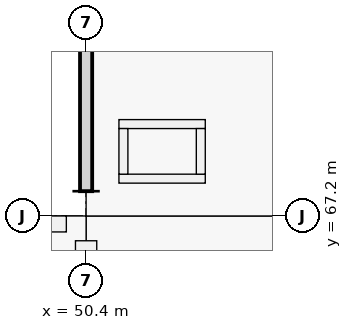
"""IFC4 building model, lengths in metres.
Left out: names, types, materials, properties, quantities, classifications, styles, units other than length and angle.
Written with IfcOpenShell. Run it as: python <this file> out.ifc"""

import sys

from ifc_helpers import new_model, si_unit, direction, frame, frame_2d, origin, origin_2d, place, context, subcontext, project, spatial, rectangle, extrude, element, save


model = new_model("IFC4")
c1 = context("Model", 3, precision=1e-05, world=origin(), true_north=direction((0.0, 1.0)))
c2 = subcontext(c1, "Body", "Model", "MODEL_VIEW")
j1 = project(units=[si_unit("LENGTHUNIT", "METRE"), si_unit("PLANEANGLEUNIT", "RADIAN")], contexts=[c1])
p1 = place(None, origin())
s1 = spatial("IfcSite", under=j1, at=p1, CompositionType="ELEMENT")
p2 = place(p1, origin())
s2 = spatial("IfcBuilding", under=s1, at=p2, CompositionType="ELEMENT")
p3 = place(p2, frame((0.0, 0.0, 14.76)))
s3 = spatial("IfcBuildingStorey", under=s2, at=p3, CompositionType="ELEMENT", Elevation=14.76)
p4 = place(p3, frame((50.4, 67.2, 0.0), z_axis=(0.0, 0.0, 1.0), x_axis=(1.0, 0.0, 0.0)))
e1 = element("IfcColumn", 1, at=p4, inside=s3, PredefinedType="COLUMN", context=c2, shape_type="SweptSolid", body=[
    extrude(rectangle(XDim=0.65, YDim=0.65, at=origin_2d()), origin(), (0.0, 0.0, 1.0), 4.32),
])
p5 = place(p3, frame((50.4, 59.076, 0.0), z_axis=(0.0, 0.0, 1.0), x_axis=(0.0, 1.0, 0.0)))
e2 = element("IfcWall", 2, at=p5, inside=s3, PredefinedType="SOLIDWALL", context=c2, shape_type="SweptSolid", body=[
    extrude(rectangle(XDim=7.798, YDim=0.28, at=frame_2d((3.899, 0.0))), origin(), (0.0, 0.0, 1.0), 3.37),
])
p6 = place(p5, frame((3.149, 0.0, 0.9)))
e3 = element("IfcOpeningElement", 3, at=p6, cuts=e2, PredefinedType="OPENING", context=c2, shape_type="SweptSolid", body=[
    extrude(rectangle(XDim=1.5, YDim=1.2, at=frame_2d((0.75, 0.6))), frame((0.0, 0.14, 0.0), z_axis=(0.0, -1.0, 0.0), x_axis=(1.0, 0.0, 0.0)), (0.0, 0.0, 1.0), 0.28),
])
p7 = place(p3, frame((42.26, 67.095, 0.0), z_axis=(0.0, 0.0, 1.0), x_axis=(1.0, 0.0, 0.0)))
e4 = element("IfcWall", 4, at=p7, inside=s3, PredefinedType="PARAPET", context=c2, shape_type="SweptSolid", body=[
    extrude(rectangle(XDim=7.88, YDim=0.21, at=frame_2d((3.94, 0.0))), origin(), (0.0, 0.0, 1.0), 0.95),
])
for number, where, z_axis, x_axis in (
    (5, (50.832, 67.691, 0.0), (0.0, 0.0, 1.0), (1.0, 0.0, 0.0)),
    (6, (50.832, 68.409, 0.0), (0.0, 0.0, 1.0), (1.0, 0.0, 0.0)),
):
    element("IfcWall", number, at=place(p3, frame(where, z_axis=z_axis, x_axis=x_axis)), inside=s3, PredefinedType="PARTITIONING", context=c2, shape_type="SweptSolid", body=[
        extrude(rectangle(XDim=1.136, YDim=0.118, at=frame_2d((0.568, 0.0))), origin(), (0.0, 0.0, 1.0), 3.35),
    ])
for number, where, z_axis, x_axis in (
    (7, (50.891, 67.75, 0.0), (0.0, 0.0, 1.0), (0.0, 1.0, 0.0)),
    (8, (51.909, 67.75, 0.0), (0.0, 0.0, 1.0), (0.0, 1.0, 0.0)),
):
    element("IfcWall", number, at=place(p3, frame(where, z_axis=z_axis, x_axis=x_axis)), inside=s3, PredefinedType="PARTITIONING", context=c2, shape_type="SweptSolid", body=[
        extrude(rectangle(XDim=0.6, YDim=0.118, at=frame_2d((0.3, 0.0))), origin(), (0.0, 0.0, 1.0), 3.35),
    ])
save(model, sys.argv[1])
